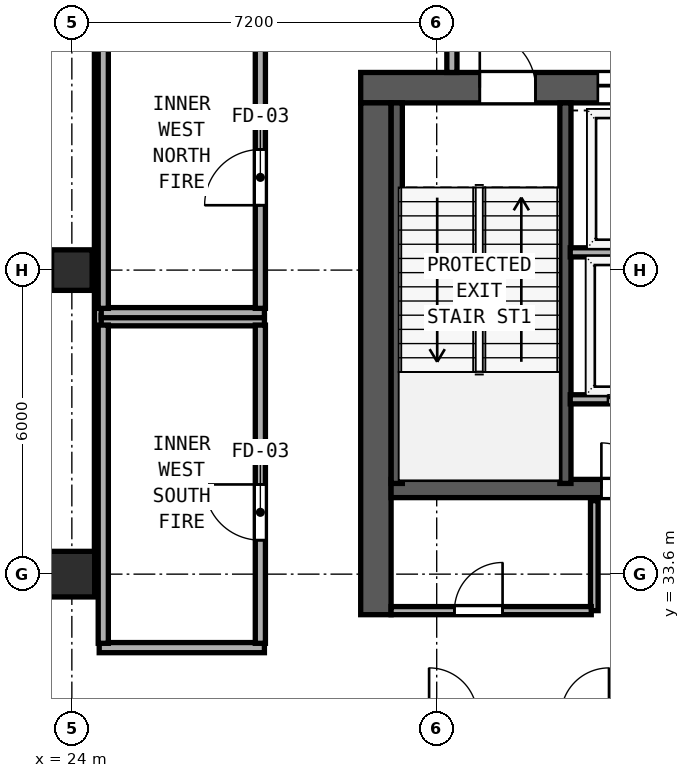
"""IFC4 building model, lengths in metres.
Left out: names, types, materials, properties, quantities, classifications, styles, units other than length and angle.
Written with IfcOpenShell. Run it as: python <this file> out.ifc"""

import sys

from ifc_helpers import new_model, si_unit, direction, frame, frame_2d, origin, origin_2d, place, context, subcontext, project, spatial, rectangle, hollow_rectangle, extrude, element, fill, save


model = new_model("IFC4")
c1 = context("Model", 3, precision=1e-05, world=origin(), true_north=direction((0.0, 1.0)))
c2 = subcontext(c1, "Body", "Model", "MODEL_VIEW")
j1 = project(units=[si_unit("LENGTHUNIT", "METRE"), si_unit("PLANEANGLEUNIT", "RADIAN")], contexts=[c1])
p1 = place(None, origin())
s1 = spatial("IfcSite", under=j1, at=p1, CompositionType="ELEMENT")
p2 = place(p1, origin())
s2 = spatial("IfcBuilding", under=s1, at=p2, CompositionType="ELEMENT")
p3 = place(p2, frame((0.0, 0.0, 230.6)))
s3 = spatial("IfcBuildingStorey", under=s2, at=p3, CompositionType="ELEMENT", Elevation=230.6)
p4 = place(p3, frame((29.7, 43.2, 0.0), z_axis=(0.0, 0.0, 1.0), x_axis=(1.0, 0.0, 0.0)))
e1 = element("IfcWall", 1, at=p4, inside=s3, PredefinedType="SHEAR", context=c2, shape_type="SweptSolid", body=[
    extrude(rectangle(XDim=17.4, YDim=0.6, at=frame_2d((8.7, 0.0))), origin(), (0.0, 0.0, 1.0), 4.35),
])
p5 = place(p4, frame((2.35, 0.0, 0.0)))
e2 = element("IfcOpeningElement", 2, at=p5, cuts=e1, PredefinedType="OPENING", context=c2, shape_type="SweptSolid", body=[
    extrude(rectangle(XDim=1.1, YDim=2.15, at=frame_2d((0.55, 1.075))), frame((0.0, 0.31, 0.0), z_axis=(0.0, -1.0, 0.0), x_axis=(1.0, 0.0, 0.0)), (0.0, 0.0, 1.0), 0.62),
])
p6 = place(p4, frame((7.46, 0.0, 0.0)))
e3 = element("IfcOpeningElement", 3, at=p6, cuts=e1, PredefinedType="OPENING", context=c2, shape_type="SweptSolid", body=[
    extrude(rectangle(XDim=1.1, YDim=2.15, at=frame_2d((0.55, 1.075))), frame((0.0, 0.31, 0.0), z_axis=(0.0, -1.0, 0.0), x_axis=(1.0, 0.0, 0.0)), (0.0, 0.0, 1.0), 0.62),
])
p7 = place(p4, frame((13.55, 0.0, 0.0)))
e4 = element("IfcOpeningElement", 4, at=p7, cuts=e1, PredefinedType="OPENING", context=c2, shape_type="SweptSolid", body=[
    extrude(rectangle(XDim=1.1, YDim=2.15, at=frame_2d((0.55, 1.075))), frame((0.0, 0.31, 0.0), z_axis=(0.0, -1.0, 0.0), x_axis=(1.0, 0.0, 0.0)), (0.0, 0.0, 1.0), 0.62),
])
p8 = place(p4, frame((4.68, 0.0, 0.0)))
e5 = element("IfcOpeningElement", 5, at=p8, cuts=e1, PredefinedType="OPENING", context=c2, shape_type="SweptSolid", body=[
    extrude(rectangle(XDim=1.1, YDim=2.2, at=frame_2d((0.55, 1.1))), frame((0.0, 0.31, 0.0), z_axis=(0.0, -1.0, 0.0), x_axis=(1.0, 0.0, 0.0)), (0.0, 0.0, 1.0), 0.62),
])
p9 = place(p4, frame((11.04, 0.0, 0.0)))
e6 = element("IfcOpeningElement", 6, at=p9, cuts=e1, PredefinedType="OPENING", context=c2, shape_type="SweptSolid", body=[
    extrude(rectangle(XDim=1.1, YDim=2.2, at=frame_2d((0.55, 1.1))), frame((0.0, 0.31, 0.0), z_axis=(0.0, -1.0, 0.0), x_axis=(1.0, 0.0, 0.0)), (0.0, 0.0, 1.0), 0.62),
])
p10 = place(p3, frame((30.0, 32.8, 0.0), z_axis=(0.0, 0.0, 1.0), x_axis=(0.0, 1.0, 0.0)))
e7 = element("IfcWall", 7, at=p10, inside=s3, PredefinedType="SHEAR", context=c2, shape_type="SweptSolid", body=[
    extrude(rectangle(XDim=10.1, YDim=0.6, at=frame_2d((5.05, 0.0))), origin(), (0.0, 0.0, 1.0), 4.35),
])
p11 = place(p3, frame((30.3, 35.29, 0.0), z_axis=(0.0, 0.0, 1.0), x_axis=(1.0, 0.0, 0.0)))
e8 = element("IfcWall", 8, at=p11, inside=s3, PredefinedType="SHEAR", context=c2, shape_type="SweptSolid", body=[
    extrude(rectangle(XDim=16.2, YDim=0.36, at=frame_2d((8.1, 0.0))), origin(), (0.0, 0.0, 1.0), 4.35),
])
p12 = place(p11, frame((5.05, 0.0, 0.0), z_axis=(0.0, 0.0, 1.0), x_axis=(-1.0, 0.0, 0.0)))
e9 = element("IfcOpeningElement", 9, at=p12, cuts=e8, PredefinedType="OPENING", context=c2, shape_type="SweptSolid", body=[
    extrude(rectangle(XDim=0.9, YDim=2.1, at=frame_2d((0.45, 1.05))), frame((0.0, 0.19, 0.0), z_axis=(0.0, -1.0, 0.0), x_axis=(1.0, 0.0, 0.0)), (0.0, 0.0, 1.0), 0.38),
])
p13 = place(p11, frame((12.11, 0.0, 0.0), z_axis=(0.0, 0.0, 1.0), x_axis=(-1.0, 0.0, 0.0)))
e10 = element("IfcOpeningElement", 10, at=p13, cuts=e8, PredefinedType="OPENING", context=c2, shape_type="SweptSolid", body=[
    extrude(rectangle(XDim=0.9, YDim=2.1, at=frame_2d((0.45, 1.05))), frame((0.0, 0.19, 0.0), z_axis=(0.0, -1.0, 0.0), x_axis=(1.0, 0.0, 0.0)), (0.0, 0.0, 1.0), 0.38),
])
for number, where, z_axis, x_axis in (
    (11, (30.412, 35.39, 0.0), (0.0, 0.0, 1.0), (0.0, 1.0, 0.0)),
    (12, (33.74, 35.39, 0.0), (0.0, 0.0, 1.0), (0.0, 1.0, 0.0)),
):
    element("IfcWall", number, at=place(p3, frame(where, z_axis=z_axis, x_axis=x_axis)), inside=s3, PredefinedType="SHEAR", context=c2, shape_type="SweptSolid", body=[
        extrude(rectangle(XDim=7.51, YDim=0.22, at=frame_2d((3.755, 0.0))), origin(), (0.0, 0.0, 1.0), 4.35),
    ])
p14 = place(p3, frame((24.0, 33.6, 0.0), z_axis=(0.0, 0.0, 1.0), x_axis=(1.0, 0.0, 0.0)))
e13 = element("IfcColumn", 13, at=p14, inside=s3, PredefinedType="COLUMN", context=c2, shape_type="SweptSolid", body=[
    extrude(hollow_rectangle(XDim=0.9, YDim=0.9, WallThickness=0.034, at=origin_2d()), origin(), (0.0, 0.0, 1.0), 4.6),
])
p15 = place(p3, frame((24.0, 39.6, 0.0), z_axis=(0.0, 0.0, 1.0), x_axis=(1.0, 0.0, 0.0)))
e14 = element("IfcColumn", 14, at=p15, inside=s3, PredefinedType="COLUMN", context=c2, shape_type="SweptSolid", body=[
    extrude(hollow_rectangle(XDim=0.8, YDim=0.8, WallThickness=0.03, at=origin_2d()), origin(), (0.0, 0.0, 1.0), 4.6),
])
p16 = place(p3, frame((24.082, 44.311, 0.0), z_axis=(0.0, 0.0, 1.0), x_axis=(-0.948687320562, -0.316215698225, 0.0)))
e15 = element("IfcWall", 15, at=p16, inside=s3, PredefinedType="PARAPET", context=c2, shape_type="SweptSolid", body=[
    extrude(rectangle(XDim=6.069, YDim=0.16, at=frame_2d((3.035, 0.0))), origin(), (0.0, 0.0, 1.0), 1.15),
])
p17 = place(p3, frame((31.5, 43.5, 0.0), z_axis=(0.0, 0.0, 1.0), x_axis=(0.0, 1.0, 0.0)))
e16 = element("IfcWall", 16, at=p17, inside=s3, PredefinedType="SOLIDWALL", context=c2, shape_type="SweptSolid", body=[
    extrude(rectangle(XDim=2.935, YDim=0.2, at=frame_2d((1.468, 0.0))), origin(), (0.0, 0.0, 1.0), 4.35),
])
p18 = place(p17, frame((1.8, 0.0, 0.0), z_axis=(0.0, 0.0, 1.0), x_axis=(-1.0, 0.0, 0.0)))
e17 = element("IfcOpeningElement", 17, at=p18, cuts=e16, PredefinedType="OPENING", context=c2, shape_type="SweptSolid", body=[
    extrude(rectangle(XDim=1.1, YDim=2.15, at=frame_2d((0.55, 1.075))), frame((0.0, 0.11, 0.0), z_axis=(0.0, -1.0, 0.0), x_axis=(1.0, 0.0, 0.0)), (0.0, 0.0, 1.0), 0.22),
])
p19 = place(p3, frame((33.835, 39.95, 0.0), z_axis=(0.0, 0.0, 1.0), x_axis=(1.0, 0.0, 0.0)))
e18 = element("IfcWall", 18, at=p19, inside=s3, PredefinedType="SOLIDWALL", context=c2, shape_type="SweptSolid", body=[
    extrude(rectangle(XDim=2.77, YDim=0.18, at=frame_2d((1.385, 0.0))), origin(), (0.0, 0.0, 1.0), 4.35),
])
p20 = place(p3, frame((33.835, 37.05, 0.0), z_axis=(0.0, 0.0, 1.0), x_axis=(1.0, 0.0, 0.0)))
e19 = element("IfcWall", 19, at=p20, inside=s3, PredefinedType="SOLIDWALL", context=c2, shape_type="SweptSolid", body=[
    extrude(rectangle(XDim=2.77, YDim=0.18, at=frame_2d((1.385, 0.0))), origin(), (0.0, 0.0, 1.0), 4.35),
])
p21 = place(p20, frame((1.945, 0.0, 0.0), z_axis=(0.0, 0.0, 1.0), x_axis=(-1.0, 0.0, 0.0)))
e20 = element("IfcOpeningElement", 20, at=p21, cuts=e19, PredefinedType="OPENING", context=c2, shape_type="SweptSolid", body=[
    extrude(rectangle(XDim=1.2, YDim=2.2, at=frame_2d((0.6, 1.1))), frame((0.0, 0.1, 0.0), z_axis=(0.0, -1.0, 0.0), x_axis=(1.0, 0.0, 0.0)), (0.0, 0.0, 1.0), 0.2),
])
p22 = place(p3, frame((34.31, 32.88, 0.0), z_axis=(0.0, 0.0, 1.0), x_axis=(0.0, 1.0, 0.0)))
e21 = element("IfcWall", 21, at=p22, inside=s3, PredefinedType="SOLIDWALL", context=c2, shape_type="SweptSolid", body=[
    extrude(rectangle(XDim=2.17, YDim=0.15, at=frame_2d((1.085, 0.0))), origin(), (0.0, 0.0, 1.0), 4.35),
])
p23 = place(p3, frame((30.3, 32.88, 0.0), z_axis=(0.0, 0.0, 1.0), x_axis=(1.0, 0.0, 0.0)))
e22 = element("IfcWall", 22, at=p23, inside=s3, PredefinedType="SOLIDWALL", context=c2, shape_type="SweptSolid", body=[
    extrude(rectangle(XDim=3.95, YDim=0.16, at=frame_2d((1.975, 0.0))), origin(), (0.0, 0.0, 1.0), 4.35),
])
p24 = place(p23, frame((2.2, 0.0, 0.0), z_axis=(0.0, 0.0, 1.0), x_axis=(-1.0, 0.0, 0.0)))
e23 = element("IfcOpeningElement", 23, at=p24, cuts=e22, PredefinedType="OPENING", context=c2, shape_type="SweptSolid", body=[
    extrude(rectangle(XDim=0.95, YDim=2.12, at=frame_2d((0.475, 1.06))), frame((0.0, 0.09, 0.0), z_axis=(0.0, -1.0, 0.0), x_axis=(1.0, 0.0, 0.0)), (0.0, 0.0, 1.0), 0.18),
])
p25 = place(p3, frame((24.52, 33.6, 0.0), z_axis=(0.0, 0.0, 1.0), x_axis=(0.0, 1.0, 0.0)))
e24 = element("IfcWall", 24, at=p25, inside=s3, PredefinedType="PARTITIONING", context=c2, shape_type="SweptSolid", body=[
    extrude(rectangle(XDim=11.788, YDim=0.15, at=frame_2d((5.894, 0.0))), origin(), (0.0, 0.0, 1.0), 4.35),
])
p26 = place(p3, frame((24.58, 38.6, 0.0), z_axis=(0.0, 0.0, 1.0), x_axis=(1.0, 0.0, 0.0)))
e25 = element("IfcWall", 25, at=p26, inside=s3, PredefinedType="SOLIDWALL", context=c2, shape_type="SweptSolid", body=[
    extrude(rectangle(XDim=3.22, YDim=0.2, at=frame_2d((1.61, 0.0))), origin(), (0.0, 0.0, 1.0), 4.35),
])
p27 = place(p3, frame((24.54, 32.15, 0.0), z_axis=(0.0, 0.0, 1.0), x_axis=(1.0, 0.0, 0.0)))
e26 = element("IfcWall", 26, at=p27, inside=s3, PredefinedType="SOLIDWALL", context=c2, shape_type="SweptSolid", body=[
    extrude(rectangle(XDim=3.26, YDim=0.2, at=frame_2d((1.63, 0.0))), origin(), (0.0, 0.0, 1.0), 4.35),
])
p28 = place(p3, frame((24.62, 32.235, 0.0), z_axis=(0.0, 0.0, 1.0), x_axis=(0.0, 1.0, 0.0)))
e27 = element("IfcWall", 27, at=p28, inside=s3, PredefinedType="SOLIDWALL", context=c2, shape_type="SweptSolid", body=[
    extrude(rectangle(XDim=6.28, YDim=0.2, at=frame_2d((3.14, 0.0))), origin(), (0.0, 0.0, 1.0), 4.35),
])
p29 = place(p3, frame((27.72, 32.235, 0.0), z_axis=(0.0, 0.0, 1.0), x_axis=(0.0, 1.0, 0.0)))
e28 = element("IfcWall", 28, at=p29, inside=s3, PredefinedType="SOLIDWALL", context=c2, shape_type="SweptSolid", body=[
    extrude(rectangle(XDim=6.28, YDim=0.2, at=frame_2d((3.14, 0.0))), origin(), (0.0, 0.0, 1.0), 4.35),
])
p30 = place(p29, frame((3.135, 0.0, 0.0), z_axis=(0.0, 0.0, 1.0), x_axis=(-1.0, 0.0, 0.0)))
e29 = element("IfcOpeningElement", 29, at=p30, cuts=e28, PredefinedType="OPENING", context=c2, shape_type="SweptSolid", body=[
    extrude(rectangle(XDim=1.1, YDim=2.15, at=frame_2d((0.55, 1.075))), frame((0.0, 0.11, 0.0), z_axis=(0.0, -1.0, 0.0), x_axis=(1.0, 0.0, 0.0)), (0.0, 0.0, 1.0), 0.22),
])
p31 = place(p3, frame((24.58, 38.76, 0.0), z_axis=(0.0, 0.0, 1.0), x_axis=(1.0, 0.0, 0.0)))
e30 = element("IfcWall", 30, at=p31, inside=s3, PredefinedType="SOLIDWALL", context=c2, shape_type="SweptSolid", body=[
    extrude(rectangle(XDim=3.22, YDim=0.2, at=frame_2d((1.61, 0.0))), origin(), (0.0, 0.0, 1.0), 4.35),
])
p32 = place(p3, frame((24.62, 38.845, 0.0), z_axis=(0.0, 0.0, 1.0), x_axis=(0.0, 1.0, 0.0)))
e31 = element("IfcWall", 31, at=p32, inside=s3, PredefinedType="SOLIDWALL", context=c2, shape_type="SweptSolid", body=[
    extrude(rectangle(XDim=6.543, YDim=0.2, at=frame_2d((3.271, 0.0))), origin(), (0.0, 0.0, 1.0), 4.35),
])
p33 = place(p3, frame((27.72, 38.845, 0.0), z_axis=(0.0, 0.0, 1.0), x_axis=(0.0, 1.0, 0.0)))
e32 = element("IfcWall", 32, at=p33, inside=s3, PredefinedType="SOLIDWALL", context=c2, shape_type="SweptSolid", body=[
    extrude(rectangle(XDim=6.47, YDim=0.2, at=frame_2d((3.235, 0.0))), origin(), (0.0, 0.0, 1.0), 4.35),
])
p34 = place(p33, frame((3.135, 0.0, 0.0), z_axis=(0.0, 0.0, 1.0), x_axis=(-1.0, 0.0, 0.0)))
e33 = element("IfcOpeningElement", 33, at=p34, cuts=e32, PredefinedType="OPENING", context=c2, shape_type="SweptSolid", body=[
    extrude(rectangle(XDim=1.1, YDim=2.15, at=frame_2d((0.55, 1.075))), frame((0.0, 0.11, 0.0), z_axis=(0.0, -1.0, 0.0), x_axis=(1.0, 0.0, 0.0)), (0.0, 0.0, 1.0), 0.22),
])
p35 = place(p5, origin())
e34 = element("IfcDoor", 34, at=p35, inside=s3, OperationType="SINGLE_SWING_LEFT", PredefinedType="DOOR", context=c2, shape_type="SweptSolid", body=[
    extrude(rectangle(XDim=1.1, YDim=2.15, at=frame_2d((0.55, 1.075))), frame((0.0, 0.185, 0.0), z_axis=(0.0, -1.0, 0.0), x_axis=(1.0, 0.0, 0.0)), (0.0, 0.0, 1.0), 0.05),
])
fill(e2, e34)
p36 = place(p8, origin())
e35 = element("IfcDoor", 35, at=p36, inside=s3, OperationType="SLIDING_TO_LEFT", PredefinedType="DOOR", context=c2, shape_type="SweptSolid", body=[
    extrude(rectangle(XDim=1.1, YDim=2.2, at=frame_2d((0.55, 1.1))), frame((0.0, 0.185, 0.0), z_axis=(0.0, -1.0, 0.0), x_axis=(1.0, 0.0, 0.0)), (0.0, 0.0, 1.0), 0.05),
])
fill(e5, e35)
p37 = place(p21, origin())
e36 = element("IfcDoor", 36, at=p37, inside=s3, OperationType="SLIDING_TO_RIGHT", PredefinedType="DOOR", context=c2, shape_type="SweptSolid", body=[
    extrude(rectangle(XDim=1.2, YDim=2.2, at=frame_2d((0.6, 1.1))), frame((0.0, 0.025, 0.0), z_axis=(0.0, -1.0, 0.0), x_axis=(1.0, 0.0, 0.0)), (0.0, 0.0, 1.0), 0.05),
])
fill(e20, e36)
p38 = place(p12, origin())
e37 = element("IfcDoor", 37, at=p38, inside=s3, OperationType="SINGLE_SWING_RIGHT", PredefinedType="DOOR", context=c2, shape_type="SweptSolid", body=[
    extrude(rectangle(XDim=0.9, YDim=2.1, at=frame_2d((0.45, 1.05))), frame((0.0, 0.025, 0.0), z_axis=(0.0, -1.0, 0.0), x_axis=(1.0, 0.0, 0.0)), (0.0, 0.0, 1.0), 0.05),
])
fill(e9, e37)
p39 = place(p24, origin())
e38 = element("IfcDoor", 38, at=p39, inside=s3, OperationType="SINGLE_SWING_LEFT", PredefinedType="DOOR", context=c2, shape_type="SweptSolid", body=[
    extrude(rectangle(XDim=0.95, YDim=2.12, at=frame_2d((0.475, 1.06))), frame((0.0, 0.025, 0.0), z_axis=(0.0, -1.0, 0.0), x_axis=(1.0, 0.0, 0.0)), (0.0, 0.0, 1.0), 0.05),
])
fill(e23, e38)
p40 = place(p30, origin())
e39 = element("IfcDoor", 39, at=p40, inside=s3, OperationType="SINGLE_SWING_LEFT", PredefinedType="DOOR", context=c2, shape_type="SweptSolid", body=[
    extrude(rectangle(XDim=1.1, YDim=2.15, at=frame_2d((0.55, 1.075))), frame((0.0, 0.025, 0.0), z_axis=(0.0, -1.0, 0.0), x_axis=(1.0, 0.0, 0.0)), (0.0, 0.0, 1.0), 0.05),
])
fill(e29, e39)
p41 = place(p34, origin())
e40 = element("IfcDoor", 40, at=p41, inside=s3, OperationType="SINGLE_SWING_RIGHT", PredefinedType="DOOR", context=c2, shape_type="SweptSolid", body=[
    extrude(rectangle(XDim=1.1, YDim=2.15, at=frame_2d((0.55, 1.075))), frame((0.0, 0.025, 0.0), z_axis=(0.0, -1.0, 0.0), x_axis=(1.0, 0.0, 0.0)), (0.0, 0.0, 1.0), 0.05),
])
fill(e33, e40)
save(model, sys.argv[1])
